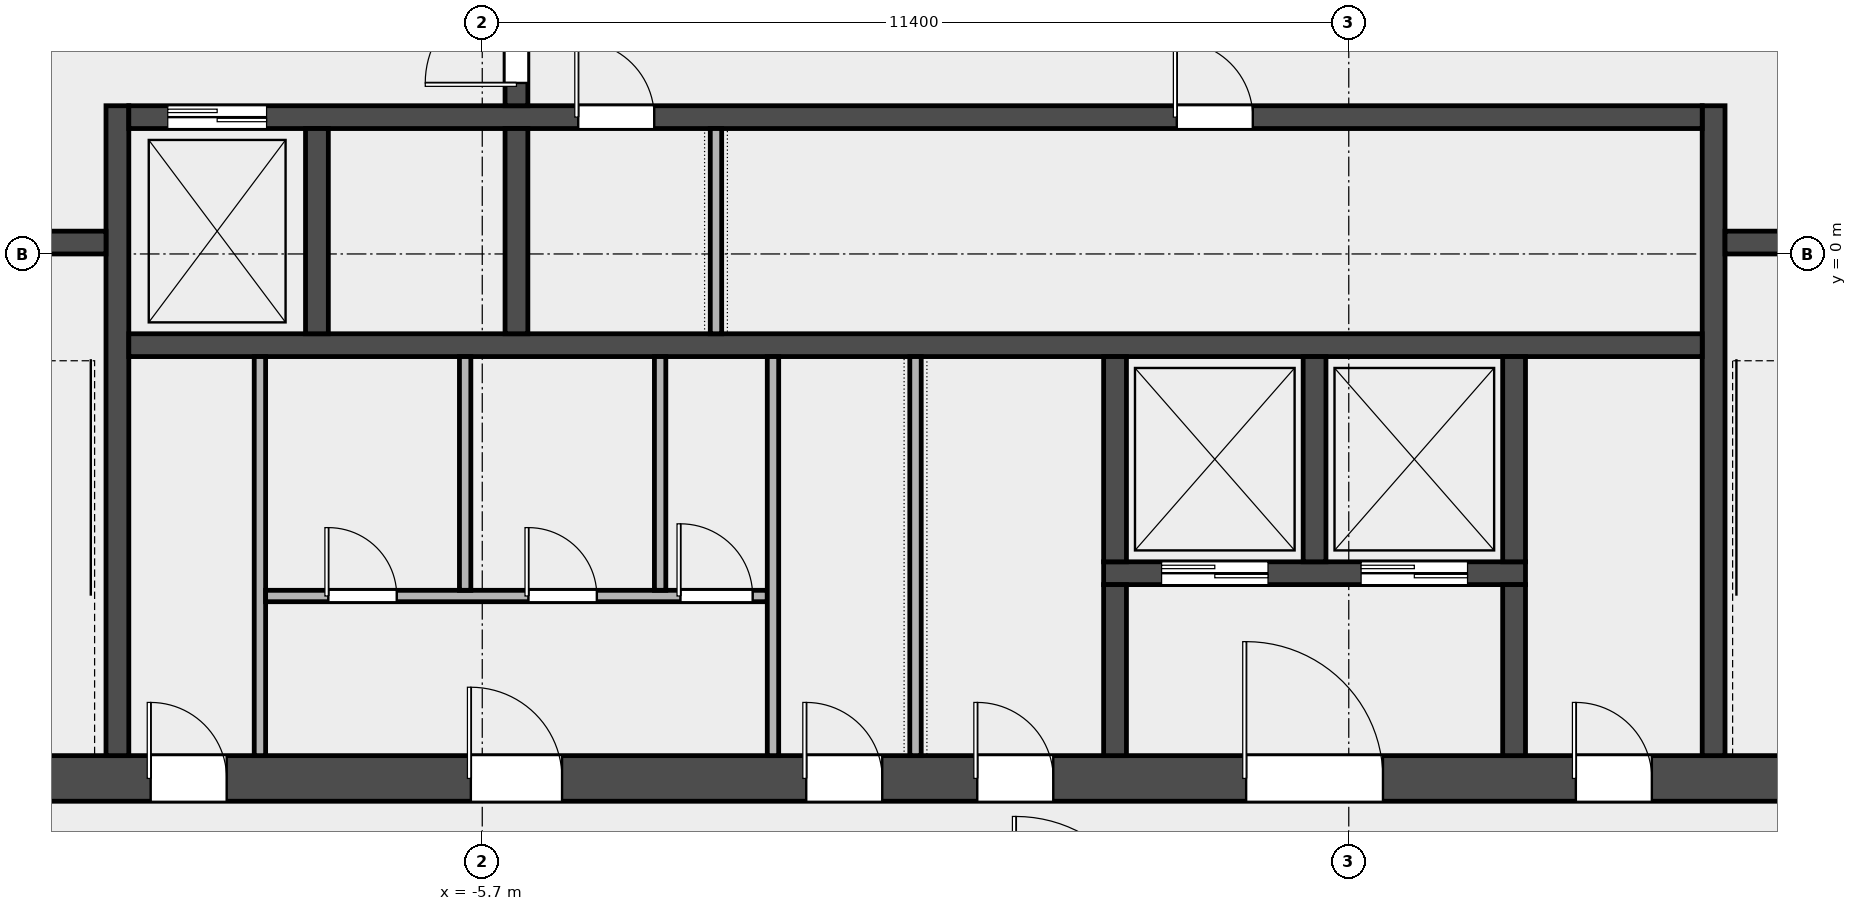
"""IFC4 building model, lengths in metres.
Left out: names, types, materials, properties, quantities, classifications, styles, units other than length and angle.
Written with IfcOpenShell. Run it as: python <this file> out.ifc"""

import sys

from ifc_helpers import new_model, si_unit, direction, frame, frame_2d, origin, place, context, subcontext, project, spatial, rectangle, extrude, element, fill, save


model = new_model("IFC4")
c1 = context("Model", 3, precision=1e-05, world=origin(), true_north=direction((0.0, 1.0)))
c2 = subcontext(c1, "Body", "Model", "MODEL_VIEW")
j1 = project(units=[si_unit("LENGTHUNIT", "METRE"), si_unit("PLANEANGLEUNIT", "RADIAN")], contexts=[c1])
p1 = place(None, origin())
s1 = spatial("IfcSite", under=j1, at=p1, CompositionType="ELEMENT")
p2 = place(p1, origin())
s2 = spatial("IfcBuilding", under=s1, at=p2, CompositionType="ELEMENT")
p3 = place(p2, frame((0.0, 0.0, 239.0)))
s3 = spatial("IfcBuildingStorey", under=s2, at=p3, CompositionType="ELEMENT", Elevation=239.0)
p4 = place(p3, frame((-14.4, -6.9, 0.0), z_axis=(0.0, 0.0, 1.0), x_axis=(1.0, 0.0, 0.0)))
e1 = element("IfcWall", 1, at=p4, inside=s3, PredefinedType="SHEAR", context=c2, shape_type="SweptSolid", body=[
    extrude(rectangle(XDim=28.8, YDim=0.6, at=frame_2d((14.4, 0.0))), origin(), (0.0, 0.0, 1.0), 3.7),
])
p5 = place(p4, frame((4.337, 0.0, 0.0)))
e2 = element("IfcOpeningElement", 2, at=p5, cuts=e1, PredefinedType="OPENING", context=c2, shape_type="SweptSolid", body=[
    extrude(rectangle(XDim=1.0, YDim=2.1, at=frame_2d((0.5, 1.05))), frame((0.0, 0.312, 0.0), z_axis=(0.0, -1.0, 0.0), x_axis=(1.0, 0.0, 0.0)), (0.0, 0.0, 1.0), 0.624),
])
p6 = place(p4, frame((8.55, 0.0, 0.0)))
e3 = element("IfcOpeningElement", 3, at=p6, cuts=e1, PredefinedType="OPENING", context=c2, shape_type="SweptSolid", body=[
    extrude(rectangle(XDim=1.2, YDim=2.1, at=frame_2d((0.6, 1.05))), frame((0.0, 0.312, 0.0), z_axis=(0.0, -1.0, 0.0), x_axis=(1.0, 0.0, 0.0)), (0.0, 0.0, 1.0), 0.624),
])
p7 = place(p4, frame((12.962, 0.0, 0.0)))
e4 = element("IfcOpeningElement", 4, at=p7, cuts=e1, PredefinedType="OPENING", context=c2, shape_type="SweptSolid", body=[
    extrude(rectangle(XDim=1.0, YDim=2.1, at=frame_2d((0.5, 1.05))), frame((0.0, 0.312, 0.0), z_axis=(0.0, -1.0, 0.0), x_axis=(1.0, 0.0, 0.0)), (0.0, 0.0, 1.0), 0.624),
])
p8 = place(p4, frame((15.212, 0.0, 0.0)))
e5 = element("IfcOpeningElement", 5, at=p8, cuts=e1, PredefinedType="OPENING", context=c2, shape_type="SweptSolid", body=[
    extrude(rectangle(XDim=1.0, YDim=2.1, at=frame_2d((0.5, 1.05))), frame((0.0, 0.312, 0.0), z_axis=(0.0, -1.0, 0.0), x_axis=(1.0, 0.0, 0.0)), (0.0, 0.0, 1.0), 0.624),
])
p9 = place(p4, frame((18.75, 0.0, 0.0)))
e6 = element("IfcOpeningElement", 6, at=p9, cuts=e1, PredefinedType="OPENING", context=c2, shape_type="SweptSolid", body=[
    extrude(rectangle(XDim=1.8, YDim=2.1, at=frame_2d((0.9, 1.05))), frame((0.0, 0.312, 0.0), z_axis=(0.0, -1.0, 0.0), x_axis=(1.0, 0.0, 0.0)), (0.0, 0.0, 1.0), 0.624),
])
p10 = place(p4, frame((23.087, 0.0, 0.0)))
e7 = element("IfcOpeningElement", 7, at=p10, cuts=e1, PredefinedType="OPENING", context=c2, shape_type="SweptSolid", body=[
    extrude(rectangle(XDim=1.0, YDim=2.1, at=frame_2d((0.5, 1.05))), frame((0.0, 0.312, 0.0), z_axis=(0.0, -1.0, 0.0), x_axis=(1.0, 0.0, 0.0)), (0.0, 0.0, 1.0), 0.624),
])
for number, where, z_axis, x_axis in (
    (8, (-10.5, -6.6, 0.0), (0.0, 0.0, 1.0), (0.0, 1.0, 0.0)),
    (9, (10.5, -6.6, 0.0), (0.0, 0.0, 1.0), (0.0, 1.0, 0.0)),
):
    element("IfcWall", number, at=place(p3, frame(where, z_axis=z_axis, x_axis=x_axis)), inside=s3, PredefinedType="SHEAR", context=c2, shape_type="SweptSolid", body=[
        extrude(rectangle(XDim=8.55, YDim=0.3, at=frame_2d((4.275, 0.0))), origin(), (0.0, 0.0, 1.0), 3.7),
    ])
p11 = place(p3, frame((-13.8, 0.15, 0.0), z_axis=(0.0, 0.0, 1.0), x_axis=(1.0, 0.0, 0.0)))
e10 = element("IfcWall", 10, at=p11, inside=s3, PredefinedType="SOLIDWALL", context=c2, shape_type="SweptSolid", body=[
    extrude(rectangle(XDim=3.15, YDim=0.3, at=frame_2d((1.575, 0.0))), origin(), (0.0, 0.0, 1.0), 3.7),
])
p12 = place(p11, frame((0.975, 0.0, 0.0)))
e11 = element("IfcOpeningElement", 11, at=p12, cuts=e10, PredefinedType="OPENING", context=c2, shape_type="SweptSolid", body=[
    extrude(rectangle(XDim=1.1, YDim=2.1, at=frame_2d((0.55, 1.05))), frame((0.0, 0.162, 0.0), z_axis=(0.0, -1.0, 0.0), x_axis=(1.0, 0.0, 0.0)), (0.0, 0.0, 1.0), 0.324),
])
p13 = place(p3, frame((10.65, 0.15, 0.0), z_axis=(0.0, 0.0, 1.0), x_axis=(1.0, 0.0, 0.0)))
e12 = element("IfcWall", 12, at=p13, inside=s3, PredefinedType="SOLIDWALL", context=c2, shape_type="SweptSolid", body=[
    extrude(rectangle(XDim=3.15, YDim=0.3, at=frame_2d((1.575, 0.0))), origin(), (0.0, 0.0, 1.0), 3.7),
])
p14 = place(p13, frame((1.025, 0.0, 0.0)))
e13 = element("IfcOpeningElement", 13, at=p14, cuts=e12, PredefinedType="OPENING", context=c2, shape_type="SweptSolid", body=[
    extrude(rectangle(XDim=1.1, YDim=2.1, at=frame_2d((0.55, 1.05))), frame((0.0, 0.162, 0.0), z_axis=(0.0, -1.0, 0.0), x_axis=(1.0, 0.0, 0.0)), (0.0, 0.0, 1.0), 0.324),
])
p15 = place(p3, frame((-10.35, -1.2, 0.0), z_axis=(0.0, 0.0, 1.0), x_axis=(1.0, 0.0, 0.0)))
e14 = element("IfcWall", 14, at=p15, inside=s3, PredefinedType="SOLIDWALL", context=c2, shape_type="SweptSolid", body=[
    extrude(rectangle(XDim=20.7, YDim=0.3, at=frame_2d((10.35, 0.0))), origin(), (0.0, 0.0, 1.0), 3.7),
])
p16 = place(p3, frame((-10.35, 1.8, 0.0), z_axis=(0.0, 0.0, 1.0), x_axis=(1.0, 0.0, 0.0)))
e15 = element("IfcWall", 15, at=p16, inside=s3, PredefinedType="SOLIDWALL", context=c2, shape_type="SweptSolid", body=[
    extrude(rectangle(XDim=20.7, YDim=0.3, at=frame_2d((10.35, 0.0))), origin(), (0.0, 0.0, 1.0), 3.7),
])
p17 = place(p16, frame((0.512, 0.0, 0.0)))
e16 = element("IfcOpeningElement", 16, at=p17, cuts=e15, PredefinedType="OPENING", context=c2, shape_type="SweptSolid", body=[
    extrude(rectangle(XDim=1.3, YDim=2.1, at=frame_2d((0.65, 1.05))), frame((0.0, 0.162, 0.0), z_axis=(0.0, -1.0, 0.0), x_axis=(1.0, 0.0, 0.0)), (0.0, 0.0, 1.0), 0.324),
])
p18 = place(p16, frame((5.913, 0.0, 0.0)))
e17 = element("IfcOpeningElement", 17, at=p18, cuts=e15, PredefinedType="OPENING", context=c2, shape_type="SweptSolid", body=[
    extrude(rectangle(XDim=1.0, YDim=2.1, at=frame_2d((0.5, 1.05))), frame((0.0, 0.162, 0.0), z_axis=(0.0, -1.0, 0.0), x_axis=(1.0, 0.0, 0.0)), (0.0, 0.0, 1.0), 0.324),
])
p19 = place(p16, frame((13.788, 0.0, 0.0)))
e18 = element("IfcOpeningElement", 18, at=p19, cuts=e15, PredefinedType="OPENING", context=c2, shape_type="SweptSolid", body=[
    extrude(rectangle(XDim=1.0, YDim=2.1, at=frame_2d((0.5, 1.05))), frame((0.0, 0.162, 0.0), z_axis=(0.0, -1.0, 0.0), x_axis=(1.0, 0.0, 0.0)), (0.0, 0.0, 1.0), 0.324),
])
for number, where, z_axis, x_axis in (
    (19, (-7.875, -1.05, 0.0), (0.0, 0.0, 1.0), (0.0, 1.0, 0.0)),
    (20, (-5.25, -1.05, 0.0), (0.0, 0.0, 1.0), (0.0, 1.0, 0.0)),
):
    element("IfcWall", number, at=place(p3, frame(where, z_axis=z_axis, x_axis=x_axis)), inside=s3, PredefinedType="SOLIDWALL", context=c2, shape_type="SweptSolid", body=[
        extrude(rectangle(XDim=2.7, YDim=0.3, at=frame_2d((1.35, 0.0))), origin(), (0.0, 0.0, 1.0), 3.7),
    ])
p20 = place(p3, frame((-5.25, 1.95, 0.0), z_axis=(0.0, 0.0, 1.0), x_axis=(0.0, 1.0, 0.0)))
e21 = element("IfcWall", 21, at=p20, inside=s3, PredefinedType="SOLIDWALL", context=c2, shape_type="SweptSolid", body=[
    extrude(rectangle(XDim=3.3, YDim=0.3, at=frame_2d((1.65, 0.0))), origin(), (0.0, 0.0, 1.0), 3.7),
])
p21 = place(p20, frame((0.3, 0.0, 0.0)))
e22 = element("IfcOpeningElement", 22, at=p21, cuts=e21, PredefinedType="OPENING", context=c2, shape_type="SweptSolid", body=[
    extrude(rectangle(XDim=1.2, YDim=2.1, at=frame_2d((0.6, 1.05))), frame((0.0, 0.162, 0.0), z_axis=(0.0, -1.0, 0.0), x_axis=(1.0, 0.0, 0.0)), (0.0, 0.0, 1.0), 0.324),
])
p22 = place(p20, frame((1.8, 0.0, 0.0)))
e23 = element("IfcOpeningElement", 23, at=p22, cuts=e21, PredefinedType="OPENING", context=c2, shape_type="SweptSolid", body=[
    extrude(rectangle(XDim=1.2, YDim=2.1, at=frame_2d((0.6, 1.05))), frame((0.0, 0.162, 0.0), z_axis=(0.0, -1.0, 0.0), x_axis=(1.0, 0.0, 0.0)), (0.0, 0.0, 1.0), 0.324),
])
p23 = place(p3, frame((2.475, -4.2, 0.0), z_axis=(0.0, 0.0, 1.0), x_axis=(1.0, 0.0, 0.0)))
e24 = element("IfcWall", 24, at=p23, inside=s3, PredefinedType="SOLIDWALL", context=c2, shape_type="SweptSolid", body=[
    extrude(rectangle(XDim=5.55, YDim=0.3, at=frame_2d((2.775, 0.0))), origin(), (0.0, 0.0, 1.0), 3.7),
])
p24 = place(p23, frame((0.762, 0.0, 0.0)))
e25 = element("IfcOpeningElement", 25, at=p24, cuts=e24, PredefinedType="OPENING", context=c2, shape_type="SweptSolid", body=[
    extrude(rectangle(XDim=1.4, YDim=2.1, at=frame_2d((0.7, 1.05))), frame((0.0, 0.162, 0.0), z_axis=(0.0, -1.0, 0.0), x_axis=(1.0, 0.0, 0.0)), (0.0, 0.0, 1.0), 0.324),
])
p25 = place(p23, frame((3.387, 0.0, 0.0)))
e26 = element("IfcOpeningElement", 26, at=p25, cuts=e24, PredefinedType="OPENING", context=c2, shape_type="SweptSolid", body=[
    extrude(rectangle(XDim=1.4, YDim=2.1, at=frame_2d((0.7, 1.05))), frame((0.0, 0.162, 0.0), z_axis=(0.0, -1.0, 0.0), x_axis=(1.0, 0.0, 0.0)), (0.0, 0.0, 1.0), 0.324),
])
p26 = place(p3, frame((2.625, -4.05, 0.0), z_axis=(0.0, 0.0, 1.0), x_axis=(0.0, 1.0, 0.0)))
e27 = element("IfcWall", 27, at=p26, inside=s3, PredefinedType="SOLIDWALL", context=c2, shape_type="SweptSolid", body=[
    extrude(rectangle(XDim=2.7, YDim=0.3, at=frame_2d((1.35, 0.0))), origin(), (0.0, 0.0, 1.0), 3.7),
])
p27 = place(p3, frame((2.625, -6.6, 0.0), z_axis=(0.0, 0.0, 1.0), x_axis=(0.0, 1.0, 0.0)))
e28 = element("IfcWall", 28, at=p27, inside=s3, PredefinedType="SOLIDWALL", context=c2, shape_type="SweptSolid", body=[
    extrude(rectangle(XDim=2.25, YDim=0.3, at=frame_2d((1.125, 0.0))), origin(), (0.0, 0.0, 1.0), 3.7),
])
for number, where, z_axis, x_axis in (
    (29, (5.25, -4.05, 0.0), (0.0, 0.0, 1.0), (0.0, 1.0, 0.0)),
    (30, (7.875, -4.05, 0.0), (0.0, 0.0, 1.0), (0.0, 1.0, 0.0)),
):
    element("IfcWall", number, at=place(p3, frame(where, z_axis=z_axis, x_axis=x_axis)), inside=s3, PredefinedType="SOLIDWALL", context=c2, shape_type="SweptSolid", body=[
        extrude(rectangle(XDim=2.7, YDim=0.3, at=frame_2d((1.35, 0.0))), origin(), (0.0, 0.0, 1.0), 3.7),
    ])
p28 = place(p3, frame((7.875, -6.6, 0.0), z_axis=(0.0, 0.0, 1.0), x_axis=(0.0, 1.0, 0.0)))
e31 = element("IfcWall", 31, at=p28, inside=s3, PredefinedType="SOLIDWALL", context=c2, shape_type="SweptSolid", body=[
    extrude(rectangle(XDim=2.25, YDim=0.3, at=frame_2d((1.125, 0.0))), origin(), (0.0, 0.0, 1.0), 3.7),
])
p29 = place(p3, frame((-8.625, -6.6, 0.0), z_axis=(0.0, 0.0, 1.0), x_axis=(0.0, 1.0, 0.0)))
e32 = element("IfcWall", 32, at=p29, inside=s3, PredefinedType="PARTITIONING", context=c2, shape_type="SweptSolid", body=[
    extrude(rectangle(XDim=5.25, YDim=0.15, at=frame_2d((2.625, 0.0))), origin(), (0.0, 0.0, 1.0), 3.7),
])
p30 = place(p3, frame((-8.55, -4.5, 0.0), z_axis=(0.0, 0.0, 1.0), x_axis=(1.0, 0.0, 0.0)))
e33 = element("IfcWall", 33, at=p30, inside=s3, PredefinedType="PARTITIONING", context=c2, shape_type="SweptSolid", body=[
    extrude(rectangle(XDim=6.6, YDim=0.15, at=frame_2d((3.3, 0.0))), origin(), (0.0, 0.0, 1.0), 3.7),
])
p31 = place(p30, frame((0.825, 0.0, 0.0)))
e34 = element("IfcOpeningElement", 34, at=p31, cuts=e33, PredefinedType="OPENING", context=c2, shape_type="SweptSolid", body=[
    extrude(rectangle(XDim=0.9, YDim=2.1, at=frame_2d((0.45, 1.05))), frame((0.0, 0.087, 0.0), z_axis=(0.0, -1.0, 0.0), x_axis=(1.0, 0.0, 0.0)), (0.0, 0.0, 1.0), 0.174),
])
p32 = place(p30, frame((3.458, 0.0, 0.0)))
e35 = element("IfcOpeningElement", 35, at=p32, cuts=e33, PredefinedType="OPENING", context=c2, shape_type="SweptSolid", body=[
    extrude(rectangle(XDim=0.9, YDim=2.1, at=frame_2d((0.45, 1.05))), frame((0.0, 0.087, 0.0), z_axis=(0.0, -1.0, 0.0), x_axis=(1.0, 0.0, 0.0)), (0.0, 0.0, 1.0), 0.174),
])
p33 = place(p30, frame((5.458, 0.0, 0.0)))
e36 = element("IfcOpeningElement", 36, at=p33, cuts=e33, PredefinedType="OPENING", context=c2, shape_type="SweptSolid", body=[
    extrude(rectangle(XDim=0.95, YDim=2.1, at=frame_2d((0.475, 1.05))), frame((0.0, 0.087, 0.0), z_axis=(0.0, -1.0, 0.0), x_axis=(1.0, 0.0, 0.0)), (0.0, 0.0, 1.0), 0.174),
])
for number, where, z_axis, x_axis in (
    (37, (-5.925, -4.425, 0.0), (0.0, 0.0, 1.0), (0.0, 1.0, 0.0)),
    (38, (-3.36, -4.425, 0.0), (0.0, 0.0, 1.0), (0.0, 1.0, 0.0)),
):
    element("IfcWall", number, at=place(p3, frame(where, z_axis=z_axis, x_axis=x_axis)), inside=s3, PredefinedType="PARTITIONING", context=c2, shape_type="SweptSolid", body=[
        extrude(rectangle(XDim=3.075, YDim=0.15, at=frame_2d((1.538, 0.0))), origin(), (0.0, 0.0, 1.0), 3.7),
    ])
for number, where, z_axis, x_axis in (
    (39, (-1.875, -6.6, 0.0), (0.0, 0.0, 1.0), (0.0, 1.0, 0.0)),
    (40, (0.0, -6.6, 0.0), (0.0, 0.0, 1.0), (0.0, 1.0, 0.0)),
):
    element("IfcWall", number, at=place(p3, frame(where, z_axis=z_axis, x_axis=x_axis)), inside=s3, PredefinedType="PARTITIONING", context=c2, shape_type="SweptSolid", body=[
        extrude(rectangle(XDim=5.25, YDim=0.15, at=frame_2d((2.625, 0.0))), origin(), (0.0, 0.0, 1.0), 3.7),
    ])
p34 = place(p3, frame((-2.625, -1.05, 0.0), z_axis=(0.0, 0.0, 1.0), x_axis=(0.0, 1.0, 0.0)))
e41 = element("IfcWall", 41, at=p34, inside=s3, PredefinedType="PARTITIONING", context=c2, shape_type="SweptSolid", body=[
    extrude(rectangle(XDim=2.7, YDim=0.15, at=frame_2d((1.35, 0.0))), origin(), (0.0, 0.0, 1.0), 3.7),
])
p35 = place(p21, origin())
e42 = element("IfcDoor", 42, at=p35, inside=s3, OperationType="SINGLE_SWING_LEFT", PredefinedType="DOOR", context=c2, shape_type="SweptSolid", body=[
    extrude(rectangle(XDim=1.2, YDim=2.1, at=frame_2d((0.6, 1.05))), frame((0.0, 0.025, 0.0), z_axis=(0.0, -1.0, 0.0), x_axis=(1.0, 0.0, 0.0)), (0.0, 0.0, 1.0), 0.05),
])
fill(e22, e42)
p36 = place(p17, origin())
e43 = element("IfcDoor", 43, at=p36, inside=s3, OperationType="DOUBLE_DOOR_SLIDING", PredefinedType="DOOR", context=c2, shape_type="SweptSolid", body=[
    extrude(rectangle(XDim=1.3, YDim=2.1, at=frame_2d((0.65, 1.05))), frame((0.0, 0.025, 0.0), z_axis=(0.0, -1.0, 0.0), x_axis=(1.0, 0.0, 0.0)), (0.0, 0.0, 1.0), 0.05),
])
fill(e16, e43)
p37 = place(p24, origin())
e44 = element("IfcDoor", 44, at=p37, inside=s3, OperationType="DOUBLE_DOOR_SLIDING", PredefinedType="DOOR", context=c2, shape_type="SweptSolid", body=[
    extrude(rectangle(XDim=1.4, YDim=2.1, at=frame_2d((0.7, 1.05))), frame((0.0, 0.025, 0.0), z_axis=(0.0, -1.0, 0.0), x_axis=(1.0, 0.0, 0.0)), (0.0, 0.0, 1.0), 0.05),
])
fill(e25, e44)
p38 = place(p25, origin())
e45 = element("IfcDoor", 45, at=p38, inside=s3, OperationType="DOUBLE_DOOR_SLIDING", PredefinedType="DOOR", context=c2, shape_type="SweptSolid", body=[
    extrude(rectangle(XDim=1.4, YDim=2.1, at=frame_2d((0.7, 1.05))), frame((0.0, 0.025, 0.0), z_axis=(0.0, -1.0, 0.0), x_axis=(1.0, 0.0, 0.0)), (0.0, 0.0, 1.0), 0.05),
])
fill(e26, e45)
p39 = place(p5, origin())
e46 = element("IfcDoor", 46, at=p39, inside=s3, OperationType="SINGLE_SWING_LEFT", PredefinedType="DOOR", context=c2, shape_type="SweptSolid", body=[
    extrude(rectangle(XDim=1.0, YDim=2.1, at=frame_2d((0.5, 1.05))), frame((0.0, 0.025, 0.0), z_axis=(0.0, -1.0, 0.0), x_axis=(1.0, 0.0, 0.0)), (0.0, 0.0, 1.0), 0.05),
])
fill(e2, e46)
p40 = place(p6, origin())
e47 = element("IfcDoor", 47, at=p40, inside=s3, OperationType="SINGLE_SWING_LEFT", PredefinedType="DOOR", context=c2, shape_type="SweptSolid", body=[
    extrude(rectangle(XDim=1.2, YDim=2.1, at=frame_2d((0.6, 1.05))), frame((0.0, 0.025, 0.0), z_axis=(0.0, -1.0, 0.0), x_axis=(1.0, 0.0, 0.0)), (0.0, 0.0, 1.0), 0.05),
])
fill(e3, e47)
p41 = place(p31, origin())
e48 = element("IfcDoor", 48, at=p41, inside=s3, OperationType="SINGLE_SWING_LEFT", PredefinedType="DOOR", context=c2, shape_type="SweptSolid", body=[
    extrude(rectangle(XDim=0.9, YDim=2.1, at=frame_2d((0.45, 1.05))), frame((0.0, 0.025, 0.0), z_axis=(0.0, -1.0, 0.0), x_axis=(1.0, 0.0, 0.0)), (0.0, 0.0, 1.0), 0.05),
])
fill(e34, e48)
p42 = place(p32, origin())
e49 = element("IfcDoor", 49, at=p42, inside=s3, OperationType="SINGLE_SWING_LEFT", PredefinedType="DOOR", context=c2, shape_type="SweptSolid", body=[
    extrude(rectangle(XDim=0.9, YDim=2.1, at=frame_2d((0.45, 1.05))), frame((0.0, 0.025, 0.0), z_axis=(0.0, -1.0, 0.0), x_axis=(1.0, 0.0, 0.0)), (0.0, 0.0, 1.0), 0.05),
])
fill(e35, e49)
p43 = place(p33, origin())
e50 = element("IfcDoor", 50, at=p43, inside=s3, OperationType="SINGLE_SWING_LEFT", PredefinedType="DOOR", context=c2, shape_type="SweptSolid", body=[
    extrude(rectangle(XDim=0.95, YDim=2.1, at=frame_2d((0.475, 1.05))), frame((0.0, 0.025, 0.0), z_axis=(0.0, -1.0, 0.0), x_axis=(1.0, 0.0, 0.0)), (0.0, 0.0, 1.0), 0.05),
])
fill(e36, e50)
p44 = place(p7, origin())
e51 = element("IfcDoor", 51, at=p44, inside=s3, OperationType="SINGLE_SWING_LEFT", PredefinedType="DOOR", context=c2, shape_type="SweptSolid", body=[
    extrude(rectangle(XDim=1.0, YDim=2.1, at=frame_2d((0.5, 1.05))), frame((0.0, 0.025, 0.0), z_axis=(0.0, -1.0, 0.0), x_axis=(1.0, 0.0, 0.0)), (0.0, 0.0, 1.0), 0.05),
])
fill(e4, e51)
p45 = place(p8, origin())
e52 = element("IfcDoor", 52, at=p45, inside=s3, OperationType="SINGLE_SWING_LEFT", PredefinedType="DOOR", context=c2, shape_type="SweptSolid", body=[
    extrude(rectangle(XDim=1.0, YDim=2.1, at=frame_2d((0.5, 1.05))), frame((0.0, 0.025, 0.0), z_axis=(0.0, -1.0, 0.0), x_axis=(1.0, 0.0, 0.0)), (0.0, 0.0, 1.0), 0.05),
])
fill(e5, e52)
p46 = place(p9, origin())
e53 = element("IfcDoor", 53, at=p46, inside=s3, OperationType="DOUBLE_DOOR_SINGLE_SWING", PredefinedType="DOOR", context=c2, shape_type="SweptSolid", body=[
    extrude(rectangle(XDim=1.8, YDim=2.1, at=frame_2d((0.9, 1.05))), frame((0.0, 0.025, 0.0), z_axis=(0.0, -1.0, 0.0), x_axis=(1.0, 0.0, 0.0)), (0.0, 0.0, 1.0), 0.05),
])
fill(e6, e53)
p47 = place(p10, origin())
e54 = element("IfcDoor", 54, at=p47, inside=s3, OperationType="SINGLE_SWING_LEFT", PredefinedType="DOOR", context=c2, shape_type="SweptSolid", body=[
    extrude(rectangle(XDim=1.0, YDim=2.1, at=frame_2d((0.5, 1.05))), frame((0.0, 0.025, 0.0), z_axis=(0.0, -1.0, 0.0), x_axis=(1.0, 0.0, 0.0)), (0.0, 0.0, 1.0), 0.05),
])
fill(e7, e54)
p48 = place(p18, origin())
e55 = element("IfcDoor", 55, at=p48, inside=s3, OperationType="SINGLE_SWING_LEFT", PredefinedType="DOOR", context=c2, shape_type="SweptSolid", body=[
    extrude(rectangle(XDim=1.0, YDim=2.1, at=frame_2d((0.5, 1.05))), frame((0.0, 0.025, 0.0), z_axis=(0.0, -1.0, 0.0), x_axis=(1.0, 0.0, 0.0)), (0.0, 0.0, 1.0), 0.05),
])
fill(e17, e55)
p49 = place(p19, origin())
e56 = element("IfcDoor", 56, at=p49, inside=s3, OperationType="SINGLE_SWING_LEFT", PredefinedType="DOOR", context=c2, shape_type="SweptSolid", body=[
    extrude(rectangle(XDim=1.0, YDim=2.1, at=frame_2d((0.5, 1.05))), frame((0.0, 0.025, 0.0), z_axis=(0.0, -1.0, 0.0), x_axis=(1.0, 0.0, 0.0)), (0.0, 0.0, 1.0), 0.05),
])
fill(e18, e56)
save(model, sys.argv[1])
